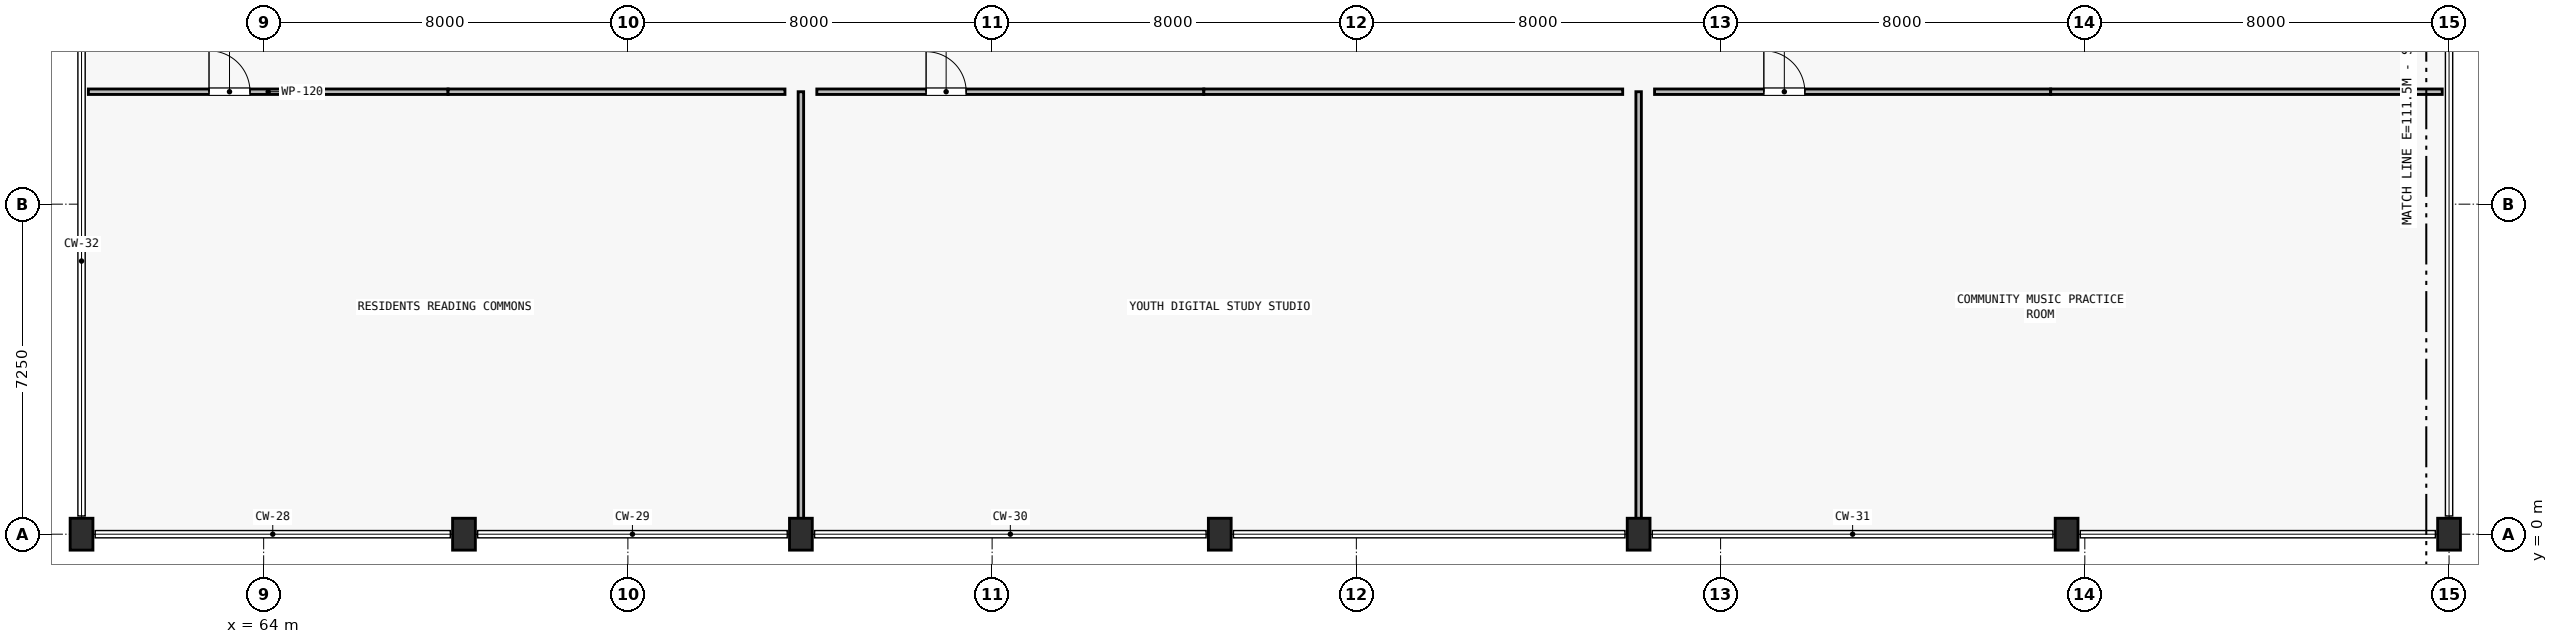
"""IFC4 building model, lengths in metres.
Left out: names, types, materials, properties, quantities, classifications, styles, units other than length and angle.
Written with IfcOpenShell. Run it as: python <this file> out.ifc"""

import sys

from ifc_helpers import new_model, si_unit, direction, frame, frame_2d, origin, origin_2d, place, context, subcontext, project, spatial, rectangle, extrude, element, fill, save


model = new_model("IFC4")
c1 = context("Model", 3, precision=1e-05, world=origin(), true_north=direction((0.0, 1.0)))
c2 = subcontext(c1, "Body", "Model", "MODEL_VIEW")
j1 = project(units=[si_unit("LENGTHUNIT", "METRE"), si_unit("PLANEANGLEUNIT", "RADIAN")], contexts=[c1])
p1 = place(None, origin())
s1 = spatial("IfcSite", under=j1, at=p1, CompositionType="ELEMENT")
p2 = place(p1, origin())
s2 = spatial("IfcBuilding", under=s1, at=p2, CompositionType="ELEMENT")
p3 = place(p2, frame((0.0, 0.0, 8.4)))
s3 = spatial("IfcBuildingStorey", under=s2, at=p3, CompositionType="ELEMENT", Elevation=8.4)
for number, where, z_axis, x_axis in (
    (1, (60.0, 0.0, 0.0), (0.0, 0.0, 1.0), (1.0, 0.0, 0.0)),
    (2, (68.4, 0.0, 0.0), (0.0, 0.0, 1.0), (1.0, 0.0, 0.0)),
    (3, (75.8, 0.0, 0.0), (0.0, 0.0, 1.0), (1.0, 0.0, 0.0)),
    (4, (85.0, 0.0, 0.0), (0.0, 0.0, 1.0), (1.0, 0.0, 0.0)),
    (5, (94.2, 0.0, 0.0), (0.0, 0.0, 1.0), (1.0, 0.0, 0.0)),
    (6, (103.6, 0.0, 0.0), (0.0, 0.0, 1.0), (1.0, 0.0, 0.0)),
    (7, (112.0, 0.0, 0.0), (0.0, 0.0, 1.0), (1.0, 0.0, 0.0)),
):
    element("IfcColumn", number, at=place(p3, frame(where, z_axis=z_axis, x_axis=x_axis)), inside=s3, PredefinedType="COLUMN", context=c2, shape_type="SweptSolid", body=[
        extrude(rectangle(XDim=0.5, YDim=0.7, at=origin_2d()), origin(), (0.0, 0.0, 1.0), 3.47),
    ])
p4 = place(p3, frame((60.15, 9.72, 0.0), z_axis=(0.0, 0.0, 1.0), x_axis=(1.0, 0.0, 0.0)))
e8 = element("IfcWall", 8, at=p4, inside=s3, PredefinedType="PARTITIONING", context=c2, shape_type="SweptSolid", body=[
    extrude(rectangle(XDim=7.9, YDim=0.12, at=frame_2d((3.95, 0.0))), origin(), (0.0, 0.0, 1.0), 2.98),
])
p5 = place(p4, frame((2.65, 0.0, 0.0)))
e9 = element("IfcOpeningElement", 9, at=p5, cuts=e8, PredefinedType="OPENING", context=c2, shape_type="SweptSolid", body=[
    extrude(rectangle(XDim=0.9, YDim=2.1, at=frame_2d((0.45, 1.05))), frame((0.0, 0.075, 0.0), z_axis=(0.0, -1.0, 0.0), x_axis=(1.0, 0.0, 0.0)), (0.0, 0.0, 1.0), 0.15),
])
p6 = place(p3, frame((68.05, 9.72, 0.0), z_axis=(0.0, 0.0, 1.0), x_axis=(1.0, 0.0, 0.0)))
e10 = element("IfcWall", 10, at=p6, inside=s3, PredefinedType="PARTITIONING", context=c2, shape_type="SweptSolid", body=[
    extrude(rectangle(XDim=7.4, YDim=0.12, at=frame_2d((3.7, 0.0))), origin(), (0.0, 0.0, 1.0), 2.98),
])
p7 = place(p3, frame((76.15, 9.72, 0.0), z_axis=(0.0, 0.0, 1.0), x_axis=(1.0, 0.0, 0.0)))
e11 = element("IfcWall", 11, at=p7, inside=s3, PredefinedType="PARTITIONING", context=c2, shape_type="SweptSolid", body=[
    extrude(rectangle(XDim=8.5, YDim=0.12, at=frame_2d((4.25, 0.0))), origin(), (0.0, 0.0, 1.0), 2.98),
])
p8 = place(p7, frame((2.4, 0.0, 0.0)))
e12 = element("IfcOpeningElement", 12, at=p8, cuts=e11, PredefinedType="OPENING", context=c2, shape_type="SweptSolid", body=[
    extrude(rectangle(XDim=0.88, YDim=2.1, at=frame_2d((0.44, 1.05))), frame((0.0, 0.075, 0.0), z_axis=(0.0, -1.0, 0.0), x_axis=(1.0, 0.0, 0.0)), (0.0, 0.0, 1.0), 0.15),
])
p9 = place(p3, frame((84.65, 9.72, 0.0), z_axis=(0.0, 0.0, 1.0), x_axis=(1.0, 0.0, 0.0)))
e13 = element("IfcWall", 13, at=p9, inside=s3, PredefinedType="PARTITIONING", context=c2, shape_type="SweptSolid", body=[
    extrude(rectangle(XDim=9.2, YDim=0.12, at=frame_2d((4.6, 0.0))), origin(), (0.0, 0.0, 1.0), 2.98),
])
p10 = place(p3, frame((94.55, 9.72, 0.0), z_axis=(0.0, 0.0, 1.0), x_axis=(1.0, 0.0, 0.0)))
e14 = element("IfcWall", 14, at=p10, inside=s3, PredefinedType="PARTITIONING", context=c2, shape_type="SweptSolid", body=[
    extrude(rectangle(XDim=8.7, YDim=0.12, at=frame_2d((4.35, 0.0))), origin(), (0.0, 0.0, 1.0), 2.98),
])
p11 = place(p10, frame((2.4, 0.0, 0.0)))
e15 = element("IfcOpeningElement", 15, at=p11, cuts=e14, PredefinedType="OPENING", context=c2, shape_type="SweptSolid", body=[
    extrude(rectangle(XDim=0.9, YDim=2.1, at=frame_2d((0.45, 1.05))), frame((0.0, 0.075, 0.0), z_axis=(0.0, -1.0, 0.0), x_axis=(1.0, 0.0, 0.0)), (0.0, 0.0, 1.0), 0.15),
])
p12 = place(p3, frame((103.25, 9.72, 0.0), z_axis=(0.0, 0.0, 1.0), x_axis=(1.0, 0.0, 0.0)))
e16 = element("IfcWall", 16, at=p12, inside=s3, PredefinedType="PARTITIONING", context=c2, shape_type="SweptSolid", body=[
    extrude(rectangle(XDim=8.6, YDim=0.12, at=frame_2d((4.3, 0.0))), origin(), (0.0, 0.0, 1.0), 2.98),
])
for number, where, z_axis, x_axis in (
    (17, (75.8, 0.12, 0.0), (0.0, 0.0, 1.0), (0.0, 1.0, 0.0)),
    (18, (94.2, 0.12, 0.0), (0.0, 0.0, 1.0), (0.0, 1.0, 0.0)),
):
    element("IfcWall", number, at=place(p3, frame(where, z_axis=z_axis, x_axis=x_axis)), inside=s3, PredefinedType="PARTITIONING", context=c2, shape_type="SweptSolid", body=[
        extrude(rectangle(XDim=9.6, YDim=0.12, at=frame_2d((4.8, 0.0))), origin(), (0.0, 0.0, 1.0), 2.35),
    ])
p13 = place(p5, origin())
e19 = element("IfcDoor", 19, at=p13, inside=s3, OperationType="SINGLE_SWING_LEFT", PredefinedType="DOOR", context=c2, shape_type="SweptSolid", body=[
    extrude(rectangle(XDim=0.9, YDim=2.1, at=frame_2d((0.45, 1.05))), frame((0.0, 0.025, 0.0), z_axis=(0.0, -1.0, 0.0), x_axis=(1.0, 0.0, 0.0)), (0.0, 0.0, 1.0), 0.05),
])
fill(e9, e19)
p14 = place(p8, origin())
e20 = element("IfcDoor", 20, at=p14, inside=s3, OperationType="SINGLE_SWING_LEFT", PredefinedType="DOOR", context=c2, shape_type="SweptSolid", body=[
    extrude(rectangle(XDim=0.88, YDim=2.1, at=frame_2d((0.44, 1.05))), frame((0.0, 0.025, 0.0), z_axis=(0.0, -1.0, 0.0), x_axis=(1.0, 0.0, 0.0)), (0.0, 0.0, 1.0), 0.05),
])
fill(e12, e20)
p15 = place(p11, origin())
e21 = element("IfcDoor", 21, at=p15, inside=s3, OperationType="SINGLE_SWING_LEFT", PredefinedType="DOOR", context=c2, shape_type="SweptSolid", body=[
    extrude(rectangle(XDim=0.9, YDim=2.1, at=frame_2d((0.45, 1.05))), frame((0.0, 0.025, 0.0), z_axis=(0.0, -1.0, 0.0), x_axis=(1.0, 0.0, 0.0)), (0.0, 0.0, 1.0), 0.05),
])
fill(e15, e21)
save(model, sys.argv[1])
